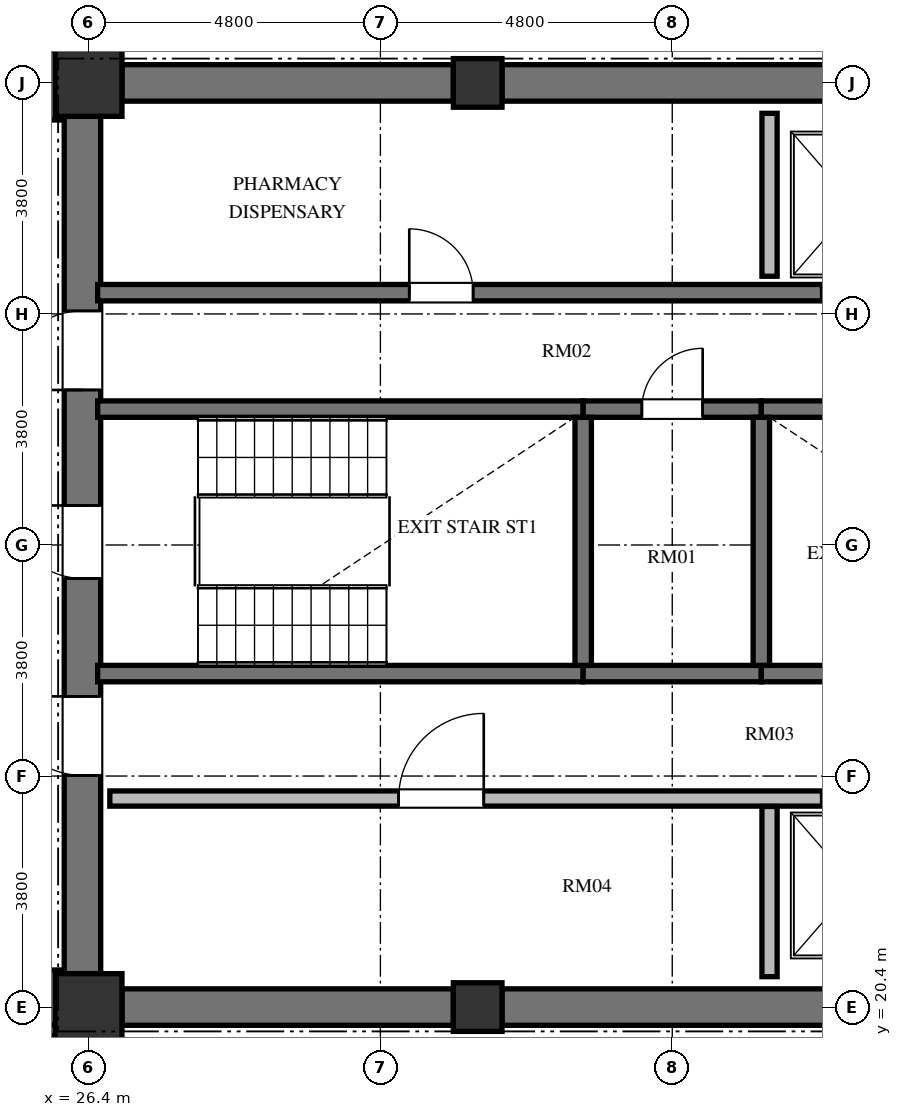
"""IFC4 building model, lengths in metres.
Left out: names, types, materials, properties, quantities, classifications, styles, units other than length and angle.
Written with IfcOpenShell. Run it as: python <this file> out.ifc"""

import sys

from ifc_helpers import new_model, si_unit, direction, frame, frame_2d, origin, origin_2d, place, context, subcontext, project, spatial, rectangle, extrude, element, fill, save


model = new_model("IFC4")
c1 = context("Model", 3, precision=1e-05, world=origin(), true_north=direction((0.0, 1.0)))
c2 = subcontext(c1, "Body", "Model", "MODEL_VIEW")
j1 = project(units=[si_unit("LENGTHUNIT", "METRE"), si_unit("PLANEANGLEUNIT", "RADIAN")], contexts=[c1])
p1 = place(None, origin())
s1 = spatial("IfcSite", under=j1, at=p1, CompositionType="ELEMENT")
p2 = place(p1, origin())
s2 = spatial("IfcBuilding", under=s1, at=p2, CompositionType="ELEMENT")
p3 = place(p2, frame((0.0, 0.0, 216.72)))
s3 = spatial("IfcBuildingStorey", under=s2, at=p3, CompositionType="ELEMENT", Elevation=216.72)
p4 = place(p3, frame((26.4, 20.4, 0.0), z_axis=(0.0, 0.0, 1.0), x_axis=(1.0, 0.0, 0.0)))
e1 = element("IfcColumn", 1, at=p4, inside=s3, PredefinedType="COLUMN", context=c2, shape_type="SweptSolid", body=[
    extrude(rectangle(XDim=1.1, YDim=1.1, at=origin_2d()), origin(), (0.0, 0.0, 1.0), 3.648),
])
for number, where, z_axis, x_axis in (
    (2, (32.8, 20.4, 0.0), (0.0, 0.0, 1.0), (1.0, 0.0, 0.0)),
    (3, (32.8, 35.6, 0.0), (0.0, 0.0, 1.0), (1.0, 0.0, 0.0)),
):
    element("IfcColumn", number, at=place(p3, frame(where, z_axis=z_axis, x_axis=x_axis)), inside=s3, PredefinedType="COLUMN", context=c2, shape_type="SweptSolid", body=[
        extrude(rectangle(XDim=0.8, YDim=0.8, at=origin_2d()), origin(), (0.0, 0.0, 1.0), 3.648),
    ])
p5 = place(p3, frame((26.4, 35.6, 0.0), z_axis=(0.0, 0.0, 1.0), x_axis=(1.0, 0.0, 0.0)))
e4 = element("IfcColumn", 4, at=p5, inside=s3, PredefinedType="COLUMN", context=c2, shape_type="SweptSolid", body=[
    extrude(rectangle(XDim=1.1, YDim=1.1, at=origin_2d()), origin(), (0.0, 0.0, 1.0), 3.648),
])
p6 = place(p3, frame((26.3, 20.95, 0.0), z_axis=(0.0, 0.0, 1.0), x_axis=(0.0, 1.0, 0.0)))
e5 = element("IfcWall", 5, at=p6, inside=s3, PredefinedType="SHEAR", context=c2, shape_type="SweptSolid", body=[
    extrude(rectangle(XDim=14.1, YDim=0.6, at=frame_2d((7.05, 0.0))), origin(), (0.0, 0.0, 1.0), 3.648),
])
p7 = place(p6, frame((6.5, 0.0, 0.0)))
e6 = element("IfcOpeningElement", 6, at=p7, cuts=e5, PredefinedType="OPENING", context=c2, shape_type="SweptSolid", body=[
    extrude(rectangle(XDim=1.2, YDim=2.15, at=frame_2d((0.6, 1.075))), frame((0.0, 0.31, 0.0), z_axis=(0.0, -1.0, 0.0), x_axis=(1.0, 0.0, 0.0)), (0.0, 0.0, 1.0), 0.62),
])
p8 = place(p6, frame((9.6, 0.0, 0.0)))
e7 = element("IfcOpeningElement", 7, at=p8, cuts=e5, PredefinedType="OPENING", context=c2, shape_type="SweptSolid", body=[
    extrude(rectangle(XDim=1.3, YDim=2.2, at=frame_2d((0.65, 1.1))), frame((0.0, 0.31, 0.0), z_axis=(0.0, -1.0, 0.0), x_axis=(1.0, 0.0, 0.0)), (0.0, 0.0, 1.0), 0.62),
])
p9 = place(p6, frame((3.26, 0.0, 0.0)))
e8 = element("IfcOpeningElement", 8, at=p9, cuts=e5, PredefinedType="OPENING", context=c2, shape_type="SweptSolid", body=[
    extrude(rectangle(XDim=1.3, YDim=2.2, at=frame_2d((0.65, 1.1))), frame((0.0, 0.31, 0.0), z_axis=(0.0, -1.0, 0.0), x_axis=(1.0, 0.0, 0.0)), (0.0, 0.0, 1.0), 0.62),
])
for number, where, z_axis, x_axis in (
    (9, (26.95, 20.4, 0.0), (0.0, 0.0, 1.0), (1.0, 0.0, 0.0)),
    (10, (26.95, 35.6, 0.0), (0.0, 0.0, 1.0), (1.0, 0.0, 0.0)),
):
    element("IfcWall", number, at=place(p3, frame(where, z_axis=z_axis, x_axis=x_axis)), inside=s3, PredefinedType="SHEAR", context=c2, shape_type="SweptSolid", body=[
        extrude(rectangle(XDim=5.45, YDim=0.6, at=frame_2d((2.725, 0.0))), origin(), (0.0, 0.0, 1.0), 3.648),
    ])
for number, where, z_axis, x_axis in (
    (11, (33.2, 20.4, 0.0), (0.0, 0.0, 1.0), (1.0, 0.0, 0.0)),
    (12, (33.2, 35.6, 0.0), (0.0, 0.0, 1.0), (1.0, 0.0, 0.0)),
):
    element("IfcWall", number, at=place(p3, frame(where, z_axis=z_axis, x_axis=x_axis)), inside=s3, PredefinedType="SHEAR", context=c2, shape_type="SweptSolid", body=[
        extrude(rectangle(XDim=5.6, YDim=0.6, at=frame_2d((2.8, 0.0))), origin(), (0.0, 0.0, 1.0), 3.648),
    ])
p10 = place(p3, frame((26.55, 30.235, 0.0), z_axis=(0.0, 0.0, 1.0), x_axis=(1.0, 0.0, 0.0)))
e13 = element("IfcWall", 13, at=p10, inside=s3, PredefinedType="SHEAR", context=c2, shape_type="SweptSolid", body=[
    extrude(rectangle(XDim=7.985, YDim=0.27, at=frame_2d((3.992, 0.0))), origin(), (0.0, 0.0, 1.0), 3.648),
])
p11 = place(p3, frame((34.535, 30.235, 0.0), z_axis=(0.0, 0.0, 1.0), x_axis=(1.0, 0.0, 0.0)))
e14 = element("IfcWall", 14, at=p11, inside=s3, PredefinedType="SHEAR", context=c2, shape_type="SweptSolid", body=[
    extrude(rectangle(XDim=2.93, YDim=0.27, at=frame_2d((1.465, 0.0))), origin(), (0.0, 0.0, 1.0), 3.648),
])
p12 = place(p11, frame((0.965, 0.0, 0.0)))
e15 = element("IfcOpeningElement", 15, at=p12, cuts=e14, PredefinedType="OPENING", context=c2, shape_type="SweptSolid", body=[
    extrude(rectangle(XDim=1.0, YDim=2.1, at=frame_2d((0.5, 1.05))), frame((0.0, 0.145, 0.0), z_axis=(0.0, -1.0, 0.0), x_axis=(1.0, 0.0, 0.0)), (0.0, 0.0, 1.0), 0.29),
])
p13 = place(p3, frame((37.465, 30.235, 0.0), z_axis=(0.0, 0.0, 1.0), x_axis=(1.0, 0.0, 0.0)))
e16 = element("IfcWall", 16, at=p13, inside=s3, PredefinedType="SHEAR", context=c2, shape_type="SweptSolid", body=[
    extrude(rectangle(XDim=7.985, YDim=0.27, at=frame_2d((3.992, 0.0))), origin(), (0.0, 0.0, 1.0), 3.648),
])
p14 = place(p13, frame((6.455, 0.0, 0.0)))
e17 = element("IfcOpeningElement", 17, at=p14, cuts=e16, PredefinedType="OPENING", context=c2, shape_type="SweptSolid", body=[
    extrude(rectangle(XDim=1.2, YDim=2.15, at=frame_2d((0.6, 1.075))), frame((0.0, 0.145, 0.0), z_axis=(0.0, -1.0, 0.0), x_axis=(1.0, 0.0, 0.0)), (0.0, 0.0, 1.0), 0.29),
])
p15 = place(p3, frame((26.55, 25.885, 0.0), z_axis=(0.0, 0.0, 1.0), x_axis=(1.0, 0.0, 0.0)))
e18 = element("IfcWall", 18, at=p15, inside=s3, PredefinedType="SHEAR", context=c2, shape_type="SweptSolid", body=[
    extrude(rectangle(XDim=7.985, YDim=0.27, at=frame_2d((3.992, 0.0))), origin(), (0.0, 0.0, 1.0), 3.648),
])
p16 = place(p3, frame((34.535, 25.885, 0.0), z_axis=(0.0, 0.0, 1.0), x_axis=(1.0, 0.0, 0.0)))
e19 = element("IfcWall", 19, at=p16, inside=s3, PredefinedType="SHEAR", context=c2, shape_type="SweptSolid", body=[
    extrude(rectangle(XDim=2.93, YDim=0.27, at=frame_2d((1.465, 0.0))), origin(), (0.0, 0.0, 1.0), 3.648),
])
p17 = place(p3, frame((37.465, 25.885, 0.0), z_axis=(0.0, 0.0, 1.0), x_axis=(1.0, 0.0, 0.0)))
e20 = element("IfcWall", 20, at=p17, inside=s3, PredefinedType="SHEAR", context=c2, shape_type="SweptSolid", body=[
    extrude(rectangle(XDim=7.985, YDim=0.27, at=frame_2d((3.992, 0.0))), origin(), (0.0, 0.0, 1.0), 3.648),
])
for number, where, z_axis, x_axis in (
    (21, (34.535, 26.02, 0.0), (0.0, 0.0, 1.0), (0.0, 1.0, 0.0)),
    (22, (37.465, 26.02, 0.0), (0.0, 0.0, 1.0), (0.0, 1.0, 0.0)),
):
    element("IfcWall", number, at=place(p3, frame(where, z_axis=z_axis, x_axis=x_axis)), inside=s3, PredefinedType="SHEAR", context=c2, shape_type="SweptSolid", body=[
        extrude(rectangle(XDim=4.08, YDim=0.27, at=frame_2d((2.04, 0.0))), origin(), (0.0, 0.0, 1.0), 3.648),
    ])
p18 = place(p3, frame((26.55, 32.15, 0.0), z_axis=(0.0, 0.0, 1.0), x_axis=(1.0, 0.0, 0.0)))
e23 = element("IfcWall", 23, at=p18, inside=s3, PredefinedType="SHEAR", context=c2, shape_type="SweptSolid", body=[
    extrude(rectangle(XDim=16.4, YDim=0.27, at=frame_2d((8.2, 0.0))), origin(), (0.0, 0.0, 1.0), 3.648),
])
p19 = place(p18, frame((5.125, 0.0, 0.0)))
e24 = element("IfcOpeningElement", 24, at=p19, cuts=e23, PredefinedType="OPENING", context=c2, shape_type="SweptSolid", body=[
    extrude(rectangle(XDim=1.05, YDim=2.15, at=frame_2d((0.525, 1.075))), frame((0.0, 0.145, 0.0), z_axis=(0.0, -1.0, 0.0), x_axis=(1.0, 0.0, 0.0)), (0.0, 0.0, 1.0), 0.29),
])
p20 = place(p18, frame((11.9, 0.0, 0.0)))
e25 = element("IfcOpeningElement", 25, at=p20, cuts=e23, PredefinedType="OPENING", context=c2, shape_type="SweptSolid", body=[
    extrude(rectangle(XDim=1.1, YDim=2.2, at=frame_2d((0.55, 1.1))), frame((0.0, 0.145, 0.0), z_axis=(0.0, -1.0, 0.0), x_axis=(1.0, 0.0, 0.0)), (0.0, 0.0, 1.0), 0.29),
])
p21 = place(p18, frame((14.5, 0.0, 0.0)))
e26 = element("IfcOpeningElement", 26, at=p21, cuts=e23, PredefinedType="OPENING", context=c2, shape_type="SweptSolid", body=[
    extrude(rectangle(XDim=1.1, YDim=2.2, at=frame_2d((0.55, 1.1))), frame((0.0, 0.145, 0.0), z_axis=(0.0, -1.0, 0.0), x_axis=(1.0, 0.0, 0.0)), (0.0, 0.0, 1.0), 0.29),
])
p22 = place(p3, frame((26.75, 23.83, 0.0), z_axis=(0.0, 0.0, 1.0), x_axis=(1.0, 0.0, 0.0)))
e27 = element("IfcWall", 27, at=p22, inside=s3, PredefinedType="SOLIDWALL", context=c2, shape_type="SweptSolid", body=[
    extrude(rectangle(XDim=16.2, YDim=0.25, at=frame_2d((8.1, 0.0))), origin(), (0.0, 0.0, 1.0), 3.448),
])
p23 = place(p22, frame((4.75, 0.0, 0.0)))
e28 = element("IfcOpeningElement", 28, at=p23, cuts=e27, PredefinedType="OPENING", context=c2, shape_type="SweptSolid", body=[
    extrude(rectangle(XDim=1.4, YDim=2.2, at=frame_2d((0.7, 1.1))), frame((0.0, 0.135, 0.0), z_axis=(0.0, -1.0, 0.0), x_axis=(1.0, 0.0, 0.0)), (0.0, 0.0, 1.0), 0.27),
])
p24 = place(p22, frame((11.7, 0.0, 0.0)))
e29 = element("IfcOpeningElement", 29, at=p24, cuts=e27, PredefinedType="OPENING", context=c2, shape_type="SweptSolid", body=[
    extrude(rectangle(XDim=1.1, YDim=2.2, at=frame_2d((0.55, 1.1))), frame((0.0, 0.135, 0.0), z_axis=(0.0, -1.0, 0.0), x_axis=(1.0, 0.0, 0.0)), (0.0, 0.0, 1.0), 0.27),
])
p25 = place(p22, frame((14.15, 0.0, 0.0)))
e30 = element("IfcOpeningElement", 30, at=p25, cuts=e27, PredefinedType="OPENING", context=c2, shape_type="SweptSolid", body=[
    extrude(rectangle(XDim=1.4, YDim=2.3, at=frame_2d((0.7, 1.15))), frame((0.0, 0.135, 0.0), z_axis=(0.0, -1.0, 0.0), x_axis=(1.0, 0.0, 0.0)), (0.0, 0.0, 1.0), 0.27),
])
p26 = place(p3, frame((37.6, 32.42, 0.0), z_axis=(0.0, 0.0, 1.0), x_axis=(0.0, 1.0, 0.0)))
e31 = element("IfcWall", 31, at=p26, inside=s3, PredefinedType="SOLIDWALL", context=c2, shape_type="SweptSolid", body=[
    extrude(rectangle(XDim=2.68, YDim=0.25, at=frame_2d((1.34, 0.0))), origin(), (0.0, 0.0, 1.0), 3.448),
])
p27 = place(p3, frame((37.6, 20.9, 0.0), z_axis=(0.0, 0.0, 1.0), x_axis=(0.0, 1.0, 0.0)))
e32 = element("IfcWall", 32, at=p27, inside=s3, PredefinedType="SOLIDWALL", context=c2, shape_type="SweptSolid", body=[
    extrude(rectangle(XDim=2.8, YDim=0.25, at=frame_2d((1.4, 0.0))), origin(), (0.0, 0.0, 1.0), 3.448),
])
p28 = place(p3, frame((25.83, 36.14, 0.0), z_axis=(0.0, 0.0, 1.0), x_axis=(0.0, -1.0, 0.0)))
e33 = element("IfcWall", 33, at=p28, inside=s3, PredefinedType="PARTITIONING", context=c2, shape_type="SweptSolid", body=[
    extrude(rectangle(XDim=1.15, YDim=0.18, at=frame_2d((0.575, 0.0))), origin(), (0.0, 0.0, 1.0), 3.448),
])
p29 = place(p3, frame((25.83, 21.01, 0.0), z_axis=(0.0, 0.0, 1.0), x_axis=(0.0, -1.0, 0.0)))
e34 = element("IfcWall", 34, at=p29, inside=s3, PredefinedType="PARTITIONING", context=c2, shape_type="SweptSolid", body=[
    extrude(rectangle(XDim=1.03, YDim=0.18, at=frame_2d((0.515, 0.0))), origin(), (0.0, 0.0, 1.0), 3.448),
])
p30 = place(p3, frame((25.87, 20.02, 0.0), z_axis=(0.0, 0.0, 1.0), x_axis=(-1.0, 0.0, 0.0)))
e35 = element("IfcWall", 35, at=p30, inside=s3, PredefinedType="PARTITIONING", context=c2, shape_type="SweptSolid", body=[
    extrude(rectangle(XDim=2.56, YDim=0.18, at=frame_2d((1.28, 0.0))), origin(), (0.0, 0.0, 1.0), 3.448),
])
p31 = place(p7, origin())
e36 = element("IfcDoor", 36, at=p31, inside=s3, OperationType="SINGLE_SWING_RIGHT", PredefinedType="DOOR", context=c2, shape_type="SweptSolid", body=[
    extrude(rectangle(XDim=1.2, YDim=2.15, at=frame_2d((0.6, 1.075))), frame((0.0, 0.025, 0.0), z_axis=(0.0, -1.0, 0.0), x_axis=(1.0, 0.0, 0.0)), (0.0, 0.0, 1.0), 0.05),
])
fill(e6, e36)
p32 = place(p12, origin())
e37 = element("IfcDoor", 37, at=p32, inside=s3, OperationType="SINGLE_SWING_RIGHT", PredefinedType="DOOR", context=c2, shape_type="SweptSolid", body=[
    extrude(rectangle(XDim=1.0, YDim=2.1, at=frame_2d((0.5, 1.05))), frame((0.0, 0.025, 0.0), z_axis=(0.0, -1.0, 0.0), x_axis=(1.0, 0.0, 0.0)), (0.0, 0.0, 1.0), 0.05),
])
fill(e15, e37)
p33 = place(p8, origin())
e38 = element("IfcDoor", 38, at=p33, inside=s3, OperationType="SINGLE_SWING_LEFT", PredefinedType="DOOR", context=c2, shape_type="SweptSolid", body=[
    extrude(rectangle(XDim=1.3, YDim=2.2, at=frame_2d((0.65, 1.1))), frame((0.0, 0.025, 0.0), z_axis=(0.0, -1.0, 0.0), x_axis=(1.0, 0.0, 0.0)), (0.0, 0.0, 1.0), 0.05),
])
fill(e7, e38)
p34 = place(p9, origin())
e39 = element("IfcDoor", 39, at=p34, inside=s3, OperationType="SINGLE_SWING_RIGHT", PredefinedType="DOOR", context=c2, shape_type="SweptSolid", body=[
    extrude(rectangle(XDim=1.3, YDim=2.2, at=frame_2d((0.65, 1.1))), frame((0.0, 0.025, 0.0), z_axis=(0.0, -1.0, 0.0), x_axis=(1.0, 0.0, 0.0)), (0.0, 0.0, 1.0), 0.05),
])
fill(e8, e39)
p35 = place(p19, origin())
e40 = element("IfcDoor", 40, at=p35, inside=s3, OperationType="SINGLE_SWING_LEFT", PredefinedType="DOOR", context=c2, shape_type="SweptSolid", body=[
    extrude(rectangle(XDim=1.05, YDim=2.15, at=frame_2d((0.525, 1.075))), frame((0.0, 0.025, 0.0), z_axis=(0.0, -1.0, 0.0), x_axis=(1.0, 0.0, 0.0)), (0.0, 0.0, 1.0), 0.05),
])
fill(e24, e40)
p36 = place(p23, origin())
e41 = element("IfcDoor", 41, at=p36, inside=s3, OperationType="SINGLE_SWING_RIGHT", PredefinedType="DOOR", context=c2, shape_type="SweptSolid", body=[
    extrude(rectangle(XDim=1.4, YDim=2.2, at=frame_2d((0.7, 1.1))), frame((0.0, 0.025, 0.0), z_axis=(0.0, -1.0, 0.0), x_axis=(1.0, 0.0, 0.0)), (0.0, 0.0, 1.0), 0.05),
])
fill(e28, e41)
p37 = place(p20, origin())
e42 = element("IfcDoor", 42, at=p37, inside=s3, OperationType="SLIDING_TO_LEFT", PredefinedType="DOOR", context=c2, shape_type="SweptSolid", body=[
    extrude(rectangle(XDim=1.1, YDim=2.2, at=frame_2d((0.55, 1.1))), frame((0.0, 0.025, 0.0), z_axis=(0.0, -1.0, 0.0), x_axis=(1.0, 0.0, 0.0)), (0.0, 0.0, 1.0), 0.05),
])
fill(e25, e42)
p38 = place(p24, origin())
e43 = element("IfcDoor", 43, at=p38, inside=s3, OperationType="SLIDING_TO_LEFT", PredefinedType="DOOR", context=c2, shape_type="SweptSolid", body=[
    extrude(rectangle(XDim=1.1, YDim=2.2, at=frame_2d((0.55, 1.1))), frame((0.0, 0.025, 0.0), z_axis=(0.0, -1.0, 0.0), x_axis=(1.0, 0.0, 0.0)), (0.0, 0.0, 1.0), 0.05),
])
fill(e29, e43)
save(model, sys.argv[1])
